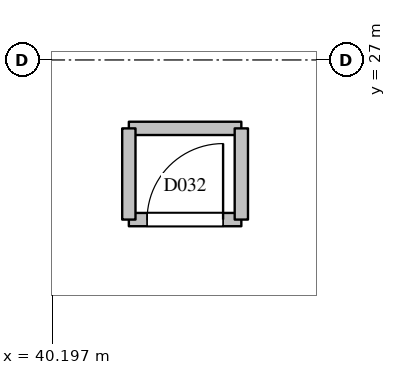
"""IFC4 building model, lengths in metres.
Left out: names, types, materials, properties, quantities, classifications, styles, units other than length and angle.
Written with IfcOpenShell. Run it as: python <this file> out.ifc"""

import sys

from ifc_helpers import new_model, si_unit, direction, frame, frame_2d, origin, place, context, subcontext, project, spatial, rectangle, extrude, element, fill, save


model = new_model("IFC4")
c1 = context("Model", 3, precision=1e-05, world=origin(), true_north=direction((0.0, 1.0)))
c2 = subcontext(c1, "Body", "Model", "MODEL_VIEW")
j1 = project(units=[si_unit("LENGTHUNIT", "METRE"), si_unit("PLANEANGLEUNIT", "RADIAN")], contexts=[c1])
p1 = place(None, origin())
s1 = spatial("IfcSite", under=j1, at=p1, CompositionType="ELEMENT")
p2 = place(p1, origin())
s2 = spatial("IfcBuilding", under=s1, at=p2, CompositionType="ELEMENT")
p3 = place(p2, frame((0.0, 0.0, 38.6)))
s3 = spatial("IfcBuildingStorey", under=s2, at=p3, CompositionType="ELEMENT", Elevation=38.6)
p4 = place(p3, frame((41.2, 24.9, 0.0), z_axis=(0.0, 0.0, 1.0), x_axis=(1.0, 0.0, 0.0)))
e1 = element("IfcWall", 1, at=p4, inside=s3, PredefinedType="PARTITIONING", context=c2, shape_type="SweptSolid", body=[
    extrude(rectangle(XDim=1.48, YDim=0.175, at=frame_2d((0.74, 0.0))), origin(), (0.0, 0.0, 1.0), 3.5),
])
p5 = place(p4, frame((0.24, 0.0, 0.0)))
e2 = element("IfcOpeningElement", 2, at=p5, cuts=e1, PredefinedType="OPENING", context=c2, shape_type="SweptSolid", body=[
    extrude(rectangle(XDim=1.0, YDim=2.1, at=frame_2d((0.5, 1.05))), frame((0.0, 0.097, 0.0), z_axis=(0.0, -1.0, 0.0), x_axis=(1.0, 0.0, 0.0)), (0.0, 0.0, 1.0), 0.195),
])
p6 = place(p3, frame((41.2, 26.1, 0.0), z_axis=(0.0, 0.0, 1.0), x_axis=(1.0, 0.0, 0.0)))
e3 = element("IfcWall", 3, at=p6, inside=s3, PredefinedType="PARTITIONING", context=c2, shape_type="SweptSolid", body=[
    extrude(rectangle(XDim=1.48, YDim=0.175, at=frame_2d((0.74, 0.0))), origin(), (0.0, 0.0, 1.0), 3.5),
])
for number, where, z_axis, x_axis in (
    (4, (41.2, 24.9, 0.0), (0.0, 0.0, 1.0), (0.0, 1.0, 0.0)),
    (5, (42.68, 24.9, 0.0), (0.0, 0.0, 1.0), (0.0, 1.0, 0.0)),
):
    element("IfcWall", number, at=place(p3, frame(where, z_axis=z_axis, x_axis=x_axis)), inside=s3, PredefinedType="PARTITIONING", context=c2, shape_type="SweptSolid", body=[
        extrude(rectangle(XDim=1.2, YDim=0.175, at=frame_2d((0.6, 0.0))), origin(), (0.0, 0.0, 1.0), 3.5),
    ])
p7 = place(p5, origin())
e6 = element("IfcDoor", 6, at=p7, inside=s3, OperationType="SINGLE_SWING_RIGHT", PredefinedType="DOOR", context=c2, shape_type="SweptSolid", body=[
    extrude(rectangle(XDim=1.0, YDim=2.1, at=frame_2d((0.5, 1.05))), frame((0.0, 0.025, 0.0), z_axis=(0.0, -1.0, 0.0), x_axis=(1.0, 0.0, 0.0)), (0.0, 0.0, 1.0), 0.05),
])
fill(e2, e6)
save(model, sys.argv[1])
